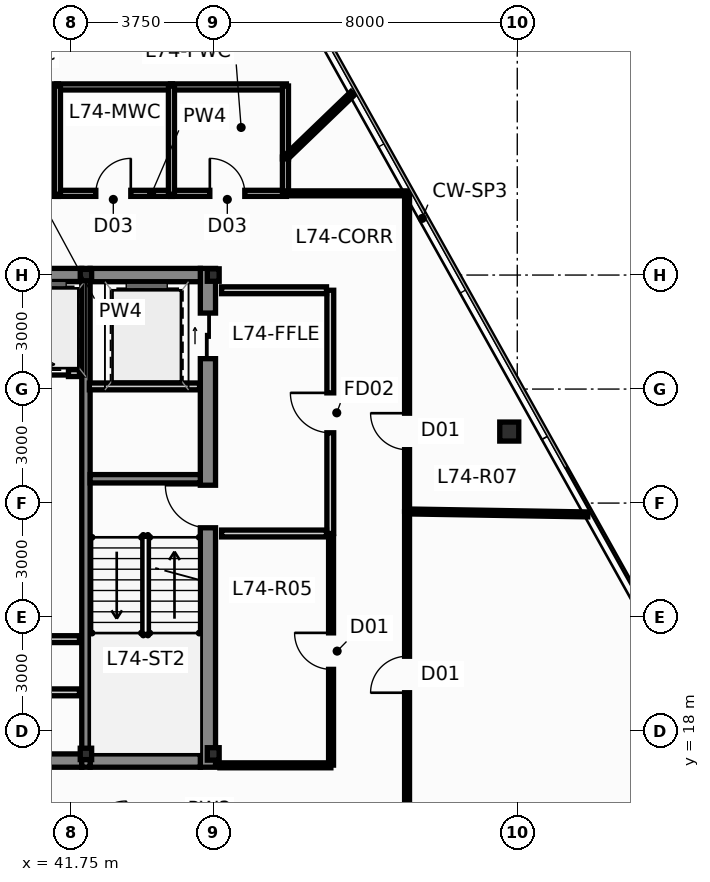
"""IFC4 building model, lengths in metres.
Left out: names, types, materials, properties, quantities, classifications, styles, units other than length and angle.
Written with IfcOpenShell. Run it as: python <this file> out.ifc"""

import sys

from ifc_helpers import new_model, si_unit, direction, frame, frame_2d, origin, origin_2d, place, context, subcontext, project, spatial, rectangle, hollow_rectangle, i_section, extrude, source, transform, mapped, element, fill, save


model = new_model("IFC4")
c1 = context("Model", 3, precision=1e-05, world=origin(), true_north=direction((0.0, 1.0)))
c2 = subcontext(c1, "Body", "Model", "MODEL_VIEW")
j1 = project(units=[si_unit("LENGTHUNIT", "METRE"), si_unit("PLANEANGLEUNIT", "RADIAN")], contexts=[c1])
p1 = place(None, origin())
s1 = spatial("IfcSite", under=j1, at=p1, CompositionType="ELEMENT")
p2 = place(p1, origin())
s2 = spatial("IfcBuilding", under=s1, at=p2, CompositionType="ELEMENT")
p3 = place(p2, frame((0.0, 0.0, 280.95)))
s3 = spatial("IfcBuildingStorey", under=s2, at=p3, CompositionType="ELEMENT", Elevation=280.95)
m1 = source(origin(), c2, "Body", "SweptSolid", [
    extrude(i_section(OverallWidth=0.311, OverallDepth=0.327, WebThickness=0.016, FlangeThickness=0.025, at=origin_2d()), origin(), (0.0, 0.0, 1.0), 3.65),
])
for number, where, z_axis, x_axis in (
    (1, (45.5, 17.4, 0.0), (0.0, 0.0, 1.0), (1.0, 0.0, 0.0)),
    (2, (45.5, 30.0, 0.0), (0.0, 0.0, 1.0), (1.0, 0.0, 0.0)),
):
    element("IfcColumn", number, at=place(p3, frame(where, z_axis=z_axis, x_axis=x_axis)), inside=s3, PredefinedType="COLUMN", context=c2, shape_type="MappedRepresentation", body=[
        mapped(m1, transform((0.0, 0.0, 0.0), scale=1.0)),
    ])
m2 = source(origin(), c2, "Body", "SweptSolid", [
    extrude(hollow_rectangle(XDim=0.3, YDim=0.3, WallThickness=0.012, at=origin_2d()), origin(), (0.0, 0.0, 1.0), 3.65),
])
for number, where, z_axis, x_axis in (
    (3, (42.15, 17.4, 0.0), (0.0, 0.0, 1.0), (1.0, 0.0, 0.0)),
    (4, (42.15, 30.0, 0.0), (0.0, 0.0, 1.0), (1.0, 0.0, 0.0)),
):
    element("IfcColumn", number, at=place(p3, frame(where, z_axis=z_axis, x_axis=x_axis)), inside=s3, PredefinedType="COLUMN", context=c2, shape_type="MappedRepresentation", body=[
        mapped(m2, transform((0.0, 0.0, 0.0), scale=1.0)),
    ])
p4 = place(p3, frame((45.36, 17.05, 0.0), z_axis=(0.0, 0.0, 1.0), x_axis=(0.0, 1.0, 0.0)))
e5 = element("IfcWall", 5, at=p4, inside=s3, PredefinedType="SHEAR", context=c2, shape_type="SweptSolid", body=[
    extrude(rectangle(XDim=13.125, YDim=0.4, at=frame_2d((6.562, 0.0))), origin(), (0.0, 0.0, 1.0), 3.65),
])
p5 = place(p4, frame((6.3, 0.0, 0.0)))
e6 = element("IfcOpeningElement", 6, at=p5, cuts=e5, PredefinedType="OPENING", context=c2, shape_type="SweptSolid", body=[
    extrude(rectangle(XDim=1.12, YDim=2.15, at=frame_2d((0.56, 1.075))), frame((0.0, 0.212, 0.0), z_axis=(0.0, -1.0, 0.0), x_axis=(1.0, 0.0, 0.0)), (0.0, 0.0, 1.0), 0.424),
])
p6 = place(p4, frame((10.75, 0.0, 0.0)))
e7 = element("IfcOpeningElement", 7, at=p6, cuts=e5, PredefinedType="OPENING", context=c2, shape_type="SweptSolid", body=[
    extrude(rectangle(XDim=1.2, YDim=2.2, at=frame_2d((0.6, 1.1))), frame((0.0, 0.212, 0.0), z_axis=(0.0, -1.0, 0.0), x_axis=(1.0, 0.0, 0.0)), (0.0, 0.0, 1.0), 0.424),
])
p7 = place(p3, frame((33.96, 17.225, 0.0), z_axis=(0.0, 0.0, 1.0), x_axis=(1.0, 0.0, 0.0)))
e8 = element("IfcWall", 8, at=p7, inside=s3, PredefinedType="SHEAR", context=c2, shape_type="SweptSolid", body=[
    extrude(rectangle(XDim=8.08, YDim=0.35, at=frame_2d((4.04, 0.0))), origin(), (0.0, 0.0, 1.0), 3.65),
])
p8 = place(p3, frame((42.26, 17.225, 0.0), z_axis=(0.0, 0.0, 1.0), x_axis=(1.0, 0.0, 0.0)))
e9 = element("IfcWall", 9, at=p8, inside=s3, PredefinedType="SHEAR", context=c2, shape_type="SweptSolid", body=[
    extrude(rectangle(XDim=2.9, YDim=0.35, at=frame_2d((1.45, 0.0))), origin(), (0.0, 0.0, 1.0), 3.65),
])
p9 = place(p3, frame((40.16, 30.0, 0.0), z_axis=(0.0, 0.0, 1.0), x_axis=(1.0, 0.0, 0.0)))
e10 = element("IfcWall", 10, at=p9, inside=s3, PredefinedType="SHEAR", context=c2, shape_type="SweptSolid", body=[
    extrude(rectangle(XDim=1.88, YDim=0.35, at=frame_2d((0.94, 0.0))), origin(), (0.0, 0.0, 1.0), 3.65),
])
p10 = place(p3, frame((42.26, 30.0, 0.0), z_axis=(0.0, 0.0, 1.0), x_axis=(1.0, 0.0, 0.0)))
e11 = element("IfcWall", 11, at=p10, inside=s3, PredefinedType="SHEAR", context=c2, shape_type="SweptSolid", body=[
    extrude(rectangle(XDim=2.9, YDim=0.35, at=frame_2d((1.45, 0.0))), origin(), (0.0, 0.0, 1.0), 3.65),
])
p11 = place(p3, frame((42.15, 17.05, 0.0), z_axis=(0.0, 0.0, 1.0), x_axis=(0.0, 1.0, 0.0)))
e12 = element("IfcWall", 12, at=p11, inside=s3, PredefinedType="SHEAR", context=c2, shape_type="SweptSolid", body=[
    extrude(rectangle(XDim=13.125, YDim=0.22, at=frame_2d((6.562, 0.0))), origin(), (0.0, 0.0, 1.0), 3.65),
])
p12 = place(p3, frame((42.26, 24.64, 0.0), z_axis=(0.0, 0.0, 1.0), x_axis=(1.0, 0.0, 0.0)))
e13 = element("IfcWall", 13, at=p12, inside=s3, PredefinedType="SHEAR", context=c2, shape_type="SweptSolid", body=[
    extrude(rectangle(XDim=2.9, YDim=0.22, at=frame_2d((1.45, 0.0))), origin(), (0.0, 0.0, 1.0), 3.65),
])
m3 = source(origin(), c2, "Body", "SweptSolid", [
    extrude(hollow_rectangle(XDim=0.5, YDim=0.5, WallThickness=0.02, at=origin_2d()), origin(), (0.0, 0.0, 1.0), 3.651),
])
p13 = place(p3, frame((53.289, 25.882, 0.0), z_axis=(-0.014912316331, -0.013775502979, 0.999793907933), x_axis=(0.678553674548, -0.734550822447, 0.0)))
e14 = element("IfcColumn", 14, at=p13, inside=s3, PredefinedType="COLUMN", context=c2, shape_type="MappedRepresentation", body=[
    mapped(m3, transform((0.0, 0.0, 0.0), scale=1.0)),
])
p14 = place(p3, frame((40.22, 27.42, 0.0), z_axis=(0.0, 0.0, 1.0), x_axis=(1.0, 0.0, 0.0)))
e15 = element("IfcWall", 15, at=p14, inside=s3, PredefinedType="PARTITIONING", context=c2, shape_type="SweptSolid", body=[
    extrude(rectangle(XDim=1.76, YDim=0.18, at=frame_2d((0.88, 0.0))), origin(), (0.0, 0.0, 1.0), 3.25),
])
p15 = place(p14, frame((0.32, 0.0, 0.0)))
e16 = element("IfcOpeningElement", 16, at=p15, cuts=e15, PredefinedType="OPENING", context=c2, shape_type="SweptSolid", body=[
    extrude(rectangle(XDim=1.15, YDim=2.2, at=frame_2d((0.575, 1.1))), frame((0.0, 0.102, 0.0), z_axis=(0.0, -1.0, 0.0), x_axis=(1.0, 0.0, 0.0)), (0.0, 0.0, 1.0), 0.204),
])
p16 = place(p3, frame((48.58, 23.2, 0.0), z_axis=(0.0, 0.0, 1.0), x_axis=(0.0, 1.0, 0.0)))
e17 = element("IfcWall", 17, at=p16, inside=s3, PredefinedType="PARTITIONING", context=c2, shape_type="SweptSolid", body=[
    extrude(rectangle(XDim=6.4, YDim=0.18, at=frame_2d((3.2, 0.0))), origin(), (0.0, 0.0, 1.0), 2.979),
])
p17 = place(p16, frame((2.65, 0.0, 0.0)))
e18 = element("IfcOpeningElement", 18, at=p17, cuts=e17, PredefinedType="OPENING", context=c2, shape_type="SweptSolid", body=[
    extrude(rectangle(XDim=1.05, YDim=2.15, at=frame_2d((0.525, 1.075))), frame((0.0, 0.102, 0.0), z_axis=(0.0, -1.0, 0.0), x_axis=(1.0, 0.0, 0.0)), (0.0, 0.0, 1.0), 0.204),
])
for number, where, z_axis, x_axis in (
    (19, (45.72, 23.2, 0.0), (0.0, 0.0, 1.0), (1.0, 0.0, 0.0)),
    (20, (45.72, 29.6, 0.0), (0.0, 0.0, 1.0), (1.0, 0.0, 0.0)),
):
    element("IfcWall", number, at=place(p3, frame(where, z_axis=z_axis, x_axis=x_axis)), inside=s3, PredefinedType="PARTITIONING", context=c2, shape_type="SweptSolid", body=[
        extrude(rectangle(XDim=2.76, YDim=0.18, at=frame_2d((1.38, 0.0))), origin(), (0.0, 0.0, 1.0), 3.25),
    ])
p18 = place(p3, frame((42.24, 27.07, 0.0), z_axis=(0.0, 0.0, 1.0), x_axis=(1.0, 0.0, 0.0)))
e21 = element("IfcWall", 21, at=p18, inside=s3, PredefinedType="PARTITIONING", context=c2, shape_type="SweptSolid", body=[
    extrude(rectangle(XDim=2.9, YDim=0.18, at=frame_2d((1.45, 0.0))), origin(), (0.0, 0.0, 1.0), 3.25),
])
p19 = place(p3, frame((40.22, 20.42, 0.0), z_axis=(0.0, 0.0, 1.0), x_axis=(1.0, 0.0, 0.0)))
e22 = element("IfcWall", 22, at=p19, inside=s3, PredefinedType="PARTITIONING", context=c2, shape_type="SweptSolid", body=[
    extrude(rectangle(XDim=1.76, YDim=0.18, at=frame_2d((0.88, 0.0))), origin(), (0.0, 0.0, 1.0), 3.25),
])
p20 = place(p3, frame((40.28, 19.02, 0.0), z_axis=(0.0, 0.0, 1.0), x_axis=(1.0, 0.0, 0.0)))
e23 = element("IfcWall", 23, at=p20, inside=s3, PredefinedType="PARTITIONING", context=c2, shape_type="SweptSolid", body=[
    extrude(rectangle(XDim=1.7, YDim=0.18, at=frame_2d((0.85, 0.0))), origin(), (0.0, 0.0, 1.0), 3.25),
])
p21 = place(p3, frame((38.375, 32.15, 0.0), z_axis=(0.0, 0.0, 1.0), x_axis=(1.0, 0.0, 0.0)))
e24 = element("IfcWall", 24, at=p21, inside=s3, PredefinedType="PLUMBINGWALL", context=c2, shape_type="SweptSolid", body=[
    extrude(rectangle(XDim=3.05, YDim=0.16, at=frame_2d((1.525, 0.0))), origin(), (0.0, 0.0, 1.0), 3.25),
])
p22 = place(p21, frame((1.035, 0.0, 0.0)))
e25 = element("IfcOpeningElement", 25, at=p22, cuts=e24, PredefinedType="OPENING", context=c2, shape_type="SweptSolid", body=[
    extrude(rectangle(XDim=0.92, YDim=2.1, at=frame_2d((0.46, 1.05))), frame((0.0, 0.092, 0.0), z_axis=(0.0, -1.0, 0.0), x_axis=(1.0, 0.0, 0.0)), (0.0, 0.0, 1.0), 0.184),
])
p23 = place(p3, frame((41.375, 32.15, 0.0), z_axis=(0.0, 0.0, 1.0), x_axis=(1.0, 0.0, 0.0)))
e26 = element("IfcWall", 26, at=p23, inside=s3, PredefinedType="PLUMBINGWALL", context=c2, shape_type="SweptSolid", body=[
    extrude(rectangle(XDim=3.05, YDim=0.16, at=frame_2d((1.525, 0.0))), origin(), (0.0, 0.0, 1.0), 3.25),
])
p24 = place(p23, frame((1.035, 0.0, 0.0)))
e27 = element("IfcOpeningElement", 27, at=p24, cuts=e26, PredefinedType="OPENING", context=c2, shape_type="SweptSolid", body=[
    extrude(rectangle(XDim=0.92, YDim=2.1, at=frame_2d((0.46, 1.05))), frame((0.0, 0.092, 0.0), z_axis=(0.0, -1.0, 0.0), x_axis=(1.0, 0.0, 0.0)), (0.0, 0.0, 1.0), 0.184),
])
p25 = place(p3, frame((44.375, 32.15, 0.0), z_axis=(0.0, 0.0, 1.0), x_axis=(1.0, 0.0, 0.0)))
e28 = element("IfcWall", 28, at=p25, inside=s3, PredefinedType="PLUMBINGWALL", context=c2, shape_type="SweptSolid", body=[
    extrude(rectangle(XDim=3.05, YDim=0.16, at=frame_2d((1.525, 0.0))), origin(), (0.0, 0.0, 1.0), 3.25),
])
p26 = place(p25, frame((1.035, 0.0, 0.0)))
e29 = element("IfcOpeningElement", 29, at=p26, cuts=e28, PredefinedType="OPENING", context=c2, shape_type="SweptSolid", body=[
    extrude(rectangle(XDim=0.92, YDim=2.1, at=frame_2d((0.46, 1.05))), frame((0.0, 0.092, 0.0), z_axis=(0.0, -1.0, 0.0), x_axis=(1.0, 0.0, 0.0)), (0.0, 0.0, 1.0), 0.184),
])
for number, where, z_axis, x_axis in (
    (30, (38.375, 34.95, 0.0), (0.0, 0.0, 1.0), (1.0, 0.0, 0.0)),
    (31, (41.375, 34.95, 0.0), (0.0, 0.0, 1.0), (1.0, 0.0, 0.0)),
    (32, (47.425, 34.95, 0.0), (0.0, 0.0, 1.0), (-1.0, 0.0, 0.0)),
):
    element("IfcWall", number, at=place(p3, frame(where, z_axis=z_axis, x_axis=x_axis)), inside=s3, PredefinedType="PLUMBINGWALL", context=c2, shape_type="SweptSolid", body=[
        extrude(rectangle(XDim=3.05, YDim=0.16, at=frame_2d((1.525, 0.0))), origin(), (0.0, 0.0, 1.0), 3.25),
    ])
p27 = place(p3, frame((41.4, 32.125, 0.0), z_axis=(0.0, 0.0, 1.0), x_axis=(0.0, 1.0, 0.0)))
e33 = element("IfcWall", 33, at=p27, inside=s3, PredefinedType="PLUMBINGWALL", context=c2, shape_type="SweptSolid", body=[
    extrude(rectangle(XDim=2.85, YDim=0.16, at=frame_2d((1.425, 0.0))), origin(), (0.0, 0.0, 1.0), 3.25),
])
p28 = place(p3, frame((44.4, 32.125, 0.0), z_axis=(0.0, 0.0, 1.0), x_axis=(0.0, 1.0, 0.0)))
e34 = element("IfcWall", 34, at=p28, inside=s3, PredefinedType="PLUMBINGWALL", context=c2, shape_type="SweptSolid", body=[
    extrude(rectangle(XDim=2.85, YDim=0.16, at=frame_2d((1.425, 0.0))), origin(), (0.0, 0.0, 1.0), 2.835),
])
p29 = place(p3, frame((47.4, 33.055, 0.0), z_axis=(0.0, 0.0, 1.0), x_axis=(0.0, 1.0, 0.0)))
e35 = element("IfcWall", 35, at=p29, inside=s3, PredefinedType="PLUMBINGWALL", context=c2, shape_type="SweptSolid", body=[
    extrude(rectangle(XDim=1.92, YDim=0.16, at=frame_2d((0.96, 0.0))), origin(), (0.0, 0.0, 1.0), 3.25),
])
p30 = place(p3, frame((47.4, 32.125, 0.0), z_axis=(0.0, 0.0, 1.0), x_axis=(0.0, 1.0, 0.0)))
e36 = element("IfcWall", 36, at=p30, inside=s3, PredefinedType="PLUMBINGWALL", context=c2, shape_type="SweptSolid", body=[
    extrude(rectangle(XDim=0.98, YDim=0.16, at=frame_2d((0.49, 0.0))), origin(), (0.0, 0.0, 1.0), 3.25),
])
p31 = place(p3, frame((50.6, 15.205, 0.0), z_axis=(0.0, 0.0, 1.0), x_axis=(0.0, 1.0, 0.0)))
e37 = element("IfcWall", 37, at=p31, inside=s3, PredefinedType="PARTITIONING", context=c2, shape_type="SweptSolid", body=[
    extrude(rectangle(XDim=8.57, YDim=0.13, at=frame_2d((4.285, 0.0))), origin(), (0.0, 0.0, 1.0), 2.979),
])
p32 = place(p31, frame((3.805, 0.0, 0.0)))
e38 = element("IfcOpeningElement", 38, at=p32, cuts=e37, PredefinedType="OPENING", context=c2, shape_type="SweptSolid", body=[
    extrude(rectangle(XDim=0.96, YDim=2.15, at=frame_2d((0.48, 1.075))), frame((0.0, 0.077, 0.0), z_axis=(0.0, -1.0, 0.0), x_axis=(1.0, 0.0, 0.0)), (0.0, 0.0, 1.0), 0.154),
])
p33 = place(p3, frame((50.6, 23.785, 0.0), z_axis=(0.0, 0.0, 1.0), x_axis=(0.0, 1.0, 0.0)))
e39 = element("IfcWall", 39, at=p33, inside=s3, PredefinedType="PARTITIONING", context=c2, shape_type="SweptSolid", body=[
    extrude(rectangle(XDim=8.403, YDim=0.13, at=frame_2d((4.201, 0.0))), origin(), (0.0, 0.0, 1.0), 2.979),
])
p34 = place(p33, frame((1.62, 0.0, 0.0)))
e40 = element("IfcOpeningElement", 40, at=p34, cuts=e39, PredefinedType="OPENING", context=c2, shape_type="SweptSolid", body=[
    extrude(rectangle(XDim=0.96, YDim=2.15, at=frame_2d((0.48, 1.075))), frame((0.0, 0.077, 0.0), z_axis=(0.0, -1.0, 0.0), x_axis=(1.0, 0.0, 0.0)), (0.0, 0.0, 1.0), 0.154),
])
p35 = place(p3, frame((48.6, 17.105, 0.0), z_axis=(0.0, 0.0, 1.0), x_axis=(0.0, 1.0, 0.0)))
e41 = element("IfcWall", 41, at=p35, inside=s3, PredefinedType="PARTITIONING", context=c2, shape_type="SweptSolid", body=[
    extrude(rectangle(XDim=6.0, YDim=0.13, at=frame_2d((3.0, 0.0))), origin(), (0.0, 0.0, 1.0), 2.979),
])
p36 = place(p35, frame((2.52, 0.0, 0.0)))
e42 = element("IfcOpeningElement", 42, at=p36, cuts=e41, PredefinedType="OPENING", context=c2, shape_type="SweptSolid", body=[
    extrude(rectangle(XDim=0.96, YDim=2.15, at=frame_2d((0.48, 1.075))), frame((0.0, 0.077, 0.0), z_axis=(0.0, -1.0, 0.0), x_axis=(1.0, 0.0, 0.0)), (0.0, 0.0, 1.0), 0.154),
])
p37 = place(p3, frame((50.605, 23.78, 0.0), z_axis=(0.0, 0.0, 1.0), x_axis=(0.999864811157, -0.016442609567, 0.0)))
e43 = element("IfcWall", 43, at=p37, inside=s3, PredefinedType="PARTITIONING", context=c2, shape_type="SweptSolid", body=[
    extrude(rectangle(XDim=4.751, YDim=0.13, at=frame_2d((2.376, 0.0))), origin(), (0.0, 0.0, 1.0), 3.25),
])
p38 = place(p3, frame((50.612, 32.15, 0.0), z_axis=(0.0, 0.0, 1.0), x_axis=(-1.0, 0.0, 0.0)))
e44 = element("IfcWall", 44, at=p38, inside=s3, PredefinedType="PARTITIONING", context=c2, shape_type="SweptSolid", body=[
    extrude(rectangle(XDim=3.207, YDim=0.13, at=frame_2d((1.604, 0.0))), origin(), (0.0, 0.0, 1.0), 3.25),
])
p39 = place(p3, frame((45.675, 17.1, 0.0), z_axis=(0.0, 0.0, 1.0), x_axis=(1.0, 0.0, 0.0)))
e45 = element("IfcWall", 45, at=p39, inside=s3, PredefinedType="PARTITIONING", context=c2, shape_type="SweptSolid", body=[
    extrude(rectangle(XDim=2.92, YDim=0.13, at=frame_2d((1.46, 0.0))), origin(), (0.0, 0.0, 1.0), 2.835),
])
p40 = place(p3, frame((47.404, 33.083, 0.0), z_axis=(0.0, 0.0, 1.0), x_axis=(0.720486230729, 0.693469243247, 0.0)))
e46 = element("IfcWall", 46, at=p40, inside=s3, PredefinedType="PARTITIONING", context=c2, shape_type="SweptSolid", body=[
    extrude(rectangle(XDim=2.449, YDim=0.13, at=frame_2d((1.225, 0.0))), origin(), (0.0, 0.0, 1.0), 3.25),
])
p41 = place(p5, origin())
e47 = element("IfcDoor", 47, at=p41, inside=s3, OperationType="SINGLE_SWING_RIGHT", PredefinedType="DOOR", context=c2, shape_type="SweptSolid", body=[
    extrude(rectangle(XDim=1.12, YDim=2.15, at=frame_2d((0.56, 1.075))), frame((0.0, 0.025, 0.0), z_axis=(0.0, -1.0, 0.0), x_axis=(1.0, 0.0, 0.0)), (0.0, 0.0, 1.0), 0.05),
])
fill(e6, e47)
p42 = place(p6, origin())
e48 = element("IfcDoor", 48, at=p42, inside=s3, OperationType="SLIDING_TO_RIGHT", PredefinedType="DOOR", context=c2, shape_type="SweptSolid", body=[
    extrude(rectangle(XDim=1.2, YDim=2.2, at=frame_2d((0.6, 1.1))), frame((0.0, 0.025, 0.0), z_axis=(0.0, -1.0, 0.0), x_axis=(1.0, 0.0, 0.0)), (0.0, 0.0, 1.0), 0.05),
])
fill(e7, e48)
p43 = place(p15, origin())
e49 = element("IfcDoor", 49, at=p43, inside=s3, OperationType="SLIDING_TO_RIGHT", PredefinedType="DOOR", context=c2, shape_type="SweptSolid", body=[
    extrude(rectangle(XDim=1.15, YDim=2.2, at=frame_2d((0.575, 1.1))), frame((0.0, 0.025, 0.0), z_axis=(0.0, -1.0, 0.0), x_axis=(1.0, 0.0, 0.0)), (0.0, 0.0, 1.0), 0.05),
])
fill(e16, e49)
p44 = place(p17, origin())
e50 = element("IfcDoor", 50, at=p44, inside=s3, OperationType="SINGLE_SWING_RIGHT", PredefinedType="DOOR", context=c2, shape_type="SweptSolid", body=[
    extrude(rectangle(XDim=1.05, YDim=2.15, at=frame_2d((0.525, 1.075))), frame((0.0, 0.025, 0.0), z_axis=(0.0, -1.0, 0.0), x_axis=(1.0, 0.0, 0.0)), (0.0, 0.0, 1.0), 0.05),
])
fill(e18, e50)
p45 = place(p24, origin())
e51 = element("IfcDoor", 51, at=p45, inside=s3, OperationType="SINGLE_SWING_RIGHT", PredefinedType="DOOR", context=c2, shape_type="SweptSolid", body=[
    extrude(rectangle(XDim=0.92, YDim=2.1, at=frame_2d((0.46, 1.05))), frame((0.0, 0.025, 0.0), z_axis=(0.0, -1.0, 0.0), x_axis=(1.0, 0.0, 0.0)), (0.0, 0.0, 1.0), 0.05),
])
fill(e27, e51)
p46 = place(p26, origin())
e52 = element("IfcDoor", 52, at=p46, inside=s3, OperationType="SINGLE_SWING_LEFT", PredefinedType="DOOR", context=c2, shape_type="SweptSolid", body=[
    extrude(rectangle(XDim=0.92, YDim=2.1, at=frame_2d((0.46, 1.05))), frame((0.0, 0.025, 0.0), z_axis=(0.0, -1.0, 0.0), x_axis=(1.0, 0.0, 0.0)), (0.0, 0.0, 1.0), 0.05),
])
fill(e29, e52)
p47 = place(p32, origin())
e53 = element("IfcDoor", 53, at=p47, inside=s3, OperationType="SINGLE_SWING_LEFT", PredefinedType="DOOR", context=c2, shape_type="SweptSolid", body=[
    extrude(rectangle(XDim=0.96, YDim=2.15, at=frame_2d((0.48, 1.075))), frame((0.0, 0.025, 0.0), z_axis=(0.0, -1.0, 0.0), x_axis=(1.0, 0.0, 0.0)), (0.0, 0.0, 1.0), 0.05),
])
fill(e38, e53)
p48 = place(p34, origin())
e54 = element("IfcDoor", 54, at=p48, inside=s3, OperationType="SINGLE_SWING_RIGHT", PredefinedType="DOOR", context=c2, shape_type="SweptSolid", body=[
    extrude(rectangle(XDim=0.96, YDim=2.15, at=frame_2d((0.48, 1.075))), frame((0.0, 0.025, 0.0), z_axis=(0.0, -1.0, 0.0), x_axis=(1.0, 0.0, 0.0)), (0.0, 0.0, 1.0), 0.05),
])
fill(e40, e54)
p49 = place(p36, origin())
e55 = element("IfcDoor", 55, at=p49, inside=s3, OperationType="SINGLE_SWING_RIGHT", PredefinedType="DOOR", context=c2, shape_type="SweptSolid", body=[
    extrude(rectangle(XDim=0.96, YDim=2.15, at=frame_2d((0.48, 1.075))), frame((0.0, 0.025, 0.0), z_axis=(0.0, -1.0, 0.0), x_axis=(1.0, 0.0, 0.0)), (0.0, 0.0, 1.0), 0.05),
])
fill(e42, e55)
save(model, sys.argv[1])
